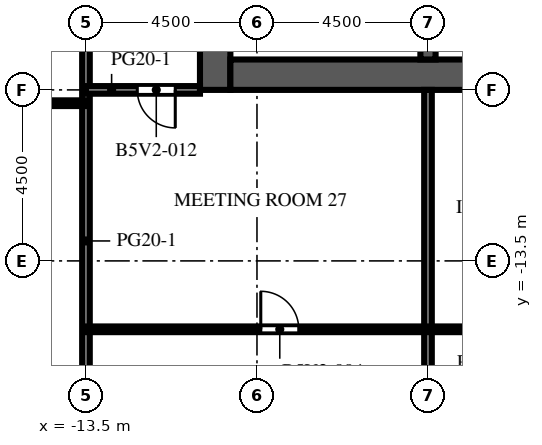
"""IFC4 building model, lengths in metres.
Left out: names, types, materials, properties, quantities, classifications, styles, units other than length and angle.
Written with IfcOpenShell. Run it as: python <this file> out.ifc"""

import sys

from ifc_helpers import new_model, si_unit, direction, frame, frame_2d, origin, place, context, subcontext, project, spatial, rectangle, extrude, element, fill, save


model = new_model("IFC4")
c1 = context("Model", 3, precision=1e-05, world=origin(), true_north=direction((0.0, 1.0)))
c2 = subcontext(c1, "Body", "Model", "MODEL_VIEW")
j1 = project(units=[si_unit("LENGTHUNIT", "METRE"), si_unit("PLANEANGLEUNIT", "RADIAN")], contexts=[c1])
p1 = place(None, origin())
s1 = spatial("IfcSite", under=j1, at=p1, CompositionType="ELEMENT")
p2 = place(p1, origin())
s2 = spatial("IfcBuilding", under=s1, at=p2, CompositionType="ELEMENT")
p3 = place(p2, frame((0.0, 0.0, 177.3)))
s3 = spatial("IfcBuildingStorey", under=s2, at=p3, CompositionType="ELEMENT", Elevation=177.3)
p4 = place(p3, frame((-10.1, -9.0, 0.0), z_axis=(0.0, 0.0, 1.0), x_axis=(0.0, 1.0, 0.0)))
e1 = element("IfcWall", 1, at=p4, inside=s3, PredefinedType="SHEAR", context=c2, shape_type="SweptSolid", body=[
    extrude(rectangle(XDim=27.5, YDim=0.8, at=frame_2d((13.75, 0.0))), origin(), (0.0, 0.0, 1.0), 4.1),
])
p5 = place(p4, frame((12.55, 0.0, 0.0)))
e2 = element("IfcOpeningElement", 2, at=p5, cuts=e1, PredefinedType="OPENING", context=c2, shape_type="SweptSolid", body=[
    extrude(rectangle(XDim=2.4, YDim=2.4, at=frame_2d((1.2, 1.2))), frame((0.0, 0.41, 0.0), z_axis=(0.0, -1.0, 0.0), x_axis=(1.0, 0.0, 0.0)), (0.0, 0.0, 1.0), 0.82),
])
p6 = place(p4, frame((6.825, 0.0, 0.0)))
e3 = element("IfcOpeningElement", 3, at=p6, cuts=e1, PredefinedType="OPENING", context=c2, shape_type="SweptSolid", body=[
    extrude(rectangle(XDim=1.2, YDim=2.1, at=frame_2d((0.6, 1.05))), frame((0.0, 0.41, 0.0), z_axis=(0.0, -1.0, 0.0), x_axis=(1.0, 0.0, 0.0)), (0.0, 0.0, 1.0), 0.82),
])
p7 = place(p4, frame((19.475, 0.0, 0.0)))
e4 = element("IfcOpeningElement", 4, at=p7, cuts=e1, PredefinedType="OPENING", context=c2, shape_type="SweptSolid", body=[
    extrude(rectangle(XDim=1.2, YDim=2.1, at=frame_2d((0.6, 1.05))), frame((0.0, 0.41, 0.0), z_axis=(0.0, -1.0, 0.0), x_axis=(1.0, 0.0, 0.0)), (0.0, 0.0, 1.0), 0.82),
])
p8 = place(p3, frame((-9.7, -8.6, 0.0), z_axis=(0.0, 0.0, 1.0), x_axis=(1.0, 0.0, 0.0)))
e5 = element("IfcWall", 5, at=p8, inside=s3, PredefinedType="SHEAR", context=c2, shape_type="SweptSolid", body=[
    extrude(rectangle(XDim=10.4, YDim=0.8, at=frame_2d((5.2, 0.0))), origin(), (0.0, 0.0, 1.0), 4.1),
])
p9 = place(p3, frame((-4.5, -8.2, 0.0), z_axis=(0.0, 0.0, 1.0), x_axis=(0.0, 1.0, 0.0)))
e6 = element("IfcWall", 6, at=p9, inside=s3, PredefinedType="SHEAR", context=c2, shape_type="SweptSolid", body=[
    extrude(rectangle(XDim=7.5, YDim=0.4, at=frame_2d((3.75, 0.0))), origin(), (0.0, 0.0, 1.0), 4.1),
])
p10 = place(p3, frame((-13.5, -26.5, 0.0), z_axis=(0.0, 0.0, 1.0), x_axis=(0.0, 1.0, 0.0)))
e7 = element("IfcWall", 7, at=p10, inside=s3, PredefinedType="PARTITIONING", context=c2, shape_type="SweptSolid", body=[
    extrude(rectangle(XDim=29.75, YDim=0.2, at=frame_2d((14.875, 0.0))), origin(), (0.0, 0.0, 1.0), 3.65),
])
p11 = place(p10, frame((27.05, 0.0, 0.0)))
e8 = element("IfcOpeningElement", 8, at=p11, cuts=e7, PredefinedType="OPENING", context=c2, shape_type="SweptSolid", body=[
    extrude(rectangle(XDim=1.0, YDim=2.1, at=frame_2d((0.5, 1.05))), frame((0.0, 0.11, 0.0), z_axis=(0.0, -1.0, 0.0), x_axis=(1.0, 0.0, 0.0)), (0.0, 0.0, 1.0), 0.22),
])
p12 = place(p3, frame((-4.5, -26.5, 0.0), z_axis=(0.0, 0.0, 1.0), x_axis=(0.0, 1.0, 0.0)))
e9 = element("IfcWall", 9, at=p12, inside=s3, PredefinedType="PARTITIONING", context=c2, shape_type="SweptSolid", body=[
    extrude(rectangle(XDim=17.5, YDim=0.2, at=frame_2d((8.75, 0.0))), origin(), (0.0, 0.0, 1.0), 3.65),
])
p13 = place(p3, frame((21.0, -15.3, 0.0), z_axis=(0.0, 0.0, 1.0), x_axis=(-1.0, 0.0, 0.0)))
e10 = element("IfcWall", 10, at=p13, inside=s3, PredefinedType="PARTITIONING", context=c2, shape_type="SweptSolid", body=[
    extrude(rectangle(XDim=34.5, YDim=0.15, at=frame_2d((17.25, 0.0))), origin(), (0.0, 0.0, 1.0), 3.65),
])
p14 = place(p13, frame((28.9, 0.0, 0.0)))
e11 = element("IfcOpeningElement", 11, at=p14, cuts=e10, PredefinedType="OPENING", context=c2, shape_type="SweptSolid", body=[
    extrude(rectangle(XDim=1.0, YDim=2.1, at=frame_2d((0.5, 1.05))), frame((0.0, 0.085, 0.0), z_axis=(0.0, -1.0, 0.0), x_axis=(1.0, 0.0, 0.0)), (0.0, 0.0, 1.0), 0.17),
])
p15 = place(p13, frame((17.15, 0.0, 0.0)))
e12 = element("IfcOpeningElement", 12, at=p15, cuts=e10, PredefinedType="OPENING", context=c2, shape_type="SweptSolid", body=[
    extrude(rectangle(XDim=1.0, YDim=2.1, at=frame_2d((0.5, 1.05))), frame((0.0, 0.085, 0.0), z_axis=(0.0, -1.0, 0.0), x_axis=(1.0, 0.0, 0.0)), (0.0, 0.0, 1.0), 0.17),
])
p16 = place(p13, frame((7.15, 0.0, 0.0)))
e13 = element("IfcOpeningElement", 13, at=p16, cuts=e10, PredefinedType="OPENING", context=c2, shape_type="SweptSolid", body=[
    extrude(rectangle(XDim=1.0, YDim=2.1, at=frame_2d((0.5, 1.05))), frame((0.0, 0.085, 0.0), z_axis=(0.0, -1.0, 0.0), x_axis=(1.0, 0.0, 0.0)), (0.0, 0.0, 1.0), 0.17),
])
p17 = place(p3, frame((-13.5, -9.35, 0.0), z_axis=(0.0, 0.0, 1.0), x_axis=(-1.0, 0.0, 0.0)))
e14 = element("IfcWall", 14, at=p17, inside=s3, PredefinedType="PARTITIONING", context=c2, shape_type="SweptSolid", body=[
    extrude(rectangle(XDim=3.9, YDim=0.15, at=frame_2d((1.95, 0.0))), origin(), (0.0, 0.0, 1.0), 3.65),
])
p18 = place(p17, frame((2.15, 0.0, 0.0)))
e15 = element("IfcOpeningElement", 15, at=p18, cuts=e14, PredefinedType="OPENING", context=c2, shape_type="SweptSolid", body=[
    extrude(rectangle(XDim=1.0, YDim=2.1, at=frame_2d((0.5, 1.05))), frame((0.0, 0.085, 0.0), z_axis=(0.0, -1.0, 0.0), x_axis=(1.0, 0.0, 0.0)), (0.0, 0.0, 1.0), 0.17),
])
p19 = place(p3, frame((-10.5, -9.0, 0.0), z_axis=(0.0, 0.0, 1.0), x_axis=(-1.0, 0.0, 0.0)))
e16 = element("IfcWall", 16, at=p19, inside=s3, PredefinedType="PARTITIONING", context=c2, shape_type="SweptSolid", body=[
    extrude(rectangle(XDim=3.0, YDim=0.2, at=frame_2d((1.5, 0.0))), origin(), (0.0, 0.0, 1.0), 3.65),
])
p20 = place(p19, frame((0.65, 0.0, 0.0)))
e17 = element("IfcOpeningElement", 17, at=p20, cuts=e16, PredefinedType="OPENING", context=c2, shape_type="SweptSolid", body=[
    extrude(rectangle(XDim=1.0, YDim=2.1, at=frame_2d((0.5, 1.05))), frame((0.0, 0.11, 0.0), z_axis=(0.0, -1.0, 0.0), x_axis=(1.0, 0.0, 0.0)), (0.0, 0.0, 1.0), 0.22),
])
p21 = place(p14, origin())
e18 = element("IfcDoor", 18, at=p21, inside=s3, OperationType="SINGLE_SWING_RIGHT", PredefinedType="DOOR", context=c2, shape_type="SweptSolid", body=[
    extrude(rectangle(XDim=1.0, YDim=2.1, at=frame_2d((0.5, 1.05))), frame((0.0, 0.025, 0.0), z_axis=(0.0, -1.0, 0.0), x_axis=(1.0, 0.0, 0.0)), (0.0, 0.0, 1.0), 0.05),
])
fill(e11, e18)
p22 = place(p20, origin())
e19 = element("IfcDoor", 19, at=p22, inside=s3, OperationType="SINGLE_SWING_LEFT", PredefinedType="DOOR", context=c2, shape_type="SweptSolid", body=[
    extrude(rectangle(XDim=1.0, YDim=2.1, at=frame_2d((0.5, 1.05))), frame((0.0, 0.025, 0.0), z_axis=(0.0, -1.0, 0.0), x_axis=(1.0, 0.0, 0.0)), (0.0, 0.0, 1.0), 0.05),
])
fill(e17, e19)
save(model, sys.argv[1])
